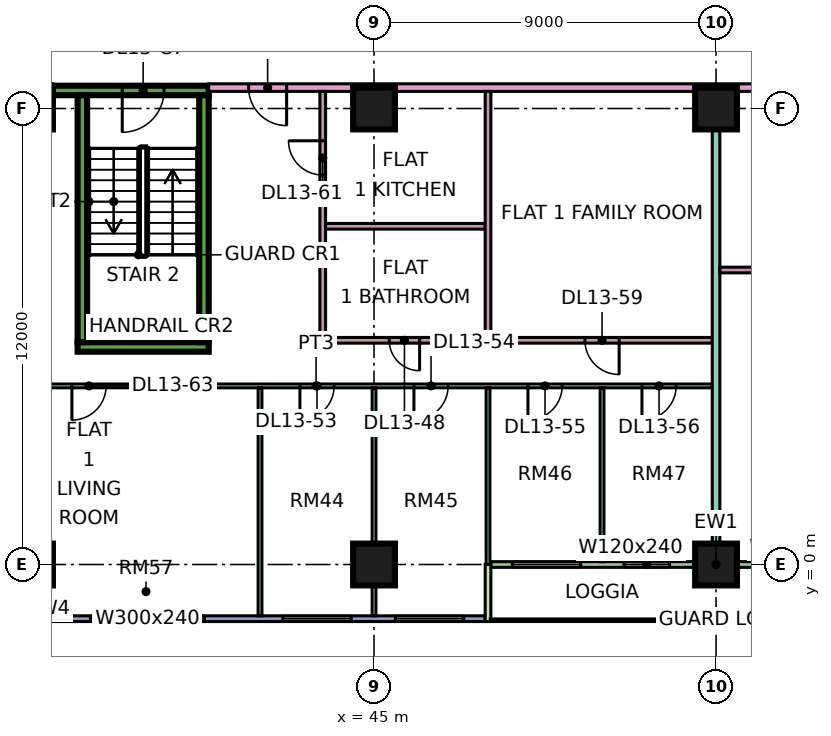
"""IFC4 building model, lengths in metres.
Left out: names, types, materials, properties, quantities, classifications, styles, units other than length and angle.
Written with IfcOpenShell. Run it as: python <this file> out.ifc"""

import sys

from ifc_helpers import new_model, si_unit, direction, frame, frame_2d, origin, origin_2d, place, context, subcontext, project, spatial, rectangle, extrude, element, fill, save


model = new_model("IFC4")
c1 = context("Model", 3, precision=1e-05, world=origin(), true_north=direction((0.0, 1.0)))
c2 = subcontext(c1, "Body", "Model", "MODEL_VIEW")
j1 = project(units=[si_unit("LENGTHUNIT", "METRE"), si_unit("PLANEANGLEUNIT", "RADIAN")], contexts=[c1])
p1 = place(None, origin())
s1 = spatial("IfcSite", under=j1, at=p1, CompositionType="ELEMENT")
p2 = place(p1, origin())
s2 = spatial("IfcBuilding", under=s1, at=p2, CompositionType="ELEMENT")
p3 = place(p2, frame((0.0, 0.0, 63.9)))
s3 = spatial("IfcBuildingStorey", under=s2, at=p3, CompositionType="ELEMENT", Elevation=63.9)
for number, where, z_axis, x_axis in (
    (1, (36.0, 0.0, 0.0), (0.0, 0.0, 1.0), (1.0, 0.0, 0.0)),
    (2, (36.0, 12.0, 0.0), (0.0, 0.0, 1.0), (1.0, 0.0, 0.0)),
    (3, (45.0, 0.0, 0.0), (0.0, 0.0, 1.0), (1.0, 0.0, 0.0)),
    (4, (45.0, 12.0, 0.0), (0.0, 0.0, 1.0), (1.0, 0.0, 0.0)),
    (5, (54.0, 0.0, 0.0), (0.0, 0.0, 1.0), (1.0, 0.0, 0.0)),
    (6, (54.0, 12.0, 0.0), (0.0, 0.0, 1.0), (1.0, 0.0, 0.0)),
):
    element("IfcColumn", number, at=place(p3, frame(where, z_axis=z_axis, x_axis=x_axis)), inside=s3, PredefinedType="COLUMN", context=c2, shape_type="SweptSolid", body=[
        extrude(rectangle(XDim=1.1, YDim=1.1, at=origin_2d()), origin(), (0.0, 0.0, 1.0), 3.75),
    ])
p4 = place(p3, frame((37.2, 5.725, 0.0), z_axis=(0.0, 0.0, 1.0), x_axis=(1.0, 0.0, 0.0)))
e7 = element("IfcWall", 7, at=p4, inside=s3, PredefinedType="SHEAR", context=c2, shape_type="SweptSolid", body=[
    extrude(rectangle(XDim=3.45, YDim=0.25, at=frame_2d((1.725, 0.0))), origin(), (0.0, 0.0, 1.0), 3.75),
])
p5 = place(p3, frame((36.55, 12.475, 0.0), z_axis=(0.0, 0.0, 1.0), x_axis=(1.0, 0.0, 0.0)))
e8 = element("IfcWall", 8, at=p5, inside=s3, PredefinedType="SHEAR", context=c2, shape_type="SweptSolid", body=[
    extrude(rectangle(XDim=4.1, YDim=0.25, at=frame_2d((2.05, 0.0))), origin(), (0.0, 0.0, 1.0), 3.75),
])
p6 = place(p5, frame((1.825, 0.0, 0.0)))
e9 = element("IfcOpeningElement", 9, at=p6, cuts=e8, PredefinedType="OPENING", context=c2, shape_type="SweptSolid", body=[
    extrude(rectangle(XDim=1.1, YDim=2.2, at=frame_2d((0.55, 1.1))), frame((0.0, 0.135, 0.0), z_axis=(0.0, -1.0, 0.0), x_axis=(1.0, 0.0, 0.0)), (0.0, 0.0, 1.0), 0.27),
])
for number, where, z_axis, x_axis in (
    (10, (37.325, 5.85, 0.0), (0.0, 0.0, 1.0), (0.0, 1.0, 0.0)),
    (11, (40.525, 5.85, 0.0), (0.0, 0.0, 1.0), (0.0, 1.0, 0.0)),
):
    element("IfcWall", number, at=place(p3, frame(where, z_axis=z_axis, x_axis=x_axis)), inside=s3, PredefinedType="SHEAR", context=c2, shape_type="SweptSolid", body=[
        extrude(rectangle(XDim=6.5, YDim=0.25, at=frame_2d((3.25, 0.0))), origin(), (0.0, 0.0, 1.0), 3.75),
    ])
p7 = place(p3, frame((36.075, -1.425, 0.0), z_axis=(0.0, 0.0, 1.0), x_axis=(1.0, 0.0, 0.0)))
e12 = element("IfcWall", 12, at=p7, inside=s3, PredefinedType="SOLIDWALL", context=c2, shape_type="SweptSolid", body=[
    extrude(rectangle(XDim=11.85, YDim=0.15, at=frame_2d((5.925, 0.0))), origin(), (0.0, 0.0, 1.0), 3.35),
])
p8 = place(p7, frame((1.462, 0.0, 0.45)))
e13 = element("IfcOpeningElement", 13, at=p8, cuts=e12, PredefinedType="OPENING", context=c2, shape_type="SweptSolid", body=[
    extrude(rectangle(XDim=3.0, YDim=2.4, at=frame_2d((1.5, 1.2))), frame((0.0, 0.085, 0.0), z_axis=(0.0, -1.0, 0.0), x_axis=(1.0, 0.0, 0.0)), (0.0, 0.0, 1.0), 0.17),
])
p9 = place(p7, frame((6.525, 0.0, 0.45)))
e14 = element("IfcOpeningElement", 14, at=p9, cuts=e12, PredefinedType="OPENING", context=c2, shape_type="SweptSolid", body=[
    extrude(rectangle(XDim=1.8, YDim=2.4, at=frame_2d((0.9, 1.2))), frame((0.0, 0.085, 0.0), z_axis=(0.0, -1.0, 0.0), x_axis=(1.0, 0.0, 0.0)), (0.0, 0.0, 1.0), 0.17),
])
p10 = place(p7, frame((9.488, 0.0, 0.45)))
e15 = element("IfcOpeningElement", 15, at=p10, cuts=e12, PredefinedType="OPENING", context=c2, shape_type="SweptSolid", body=[
    extrude(rectangle(XDim=1.8, YDim=2.4, at=frame_2d((0.9, 1.2))), frame((0.0, 0.085, 0.0), z_axis=(0.0, -1.0, 0.0), x_axis=(1.0, 0.0, 0.0)), (0.0, 0.0, 1.0), 0.17),
])
p11 = place(p3, frame((48.075, 0.0, 0.0), z_axis=(0.0, 0.0, 1.0), x_axis=(1.0, 0.0, 0.0)))
e16 = element("IfcWall", 16, at=p11, inside=s3, PredefinedType="SOLIDWALL", context=c2, shape_type="SweptSolid", body=[
    extrude(rectangle(XDim=11.85, YDim=0.15, at=frame_2d((5.925, 0.0))), origin(), (0.0, 0.0, 1.0), 3.35),
])
p12 = place(p11, frame((0.562, 0.0, 0.45)))
e17 = element("IfcOpeningElement", 17, at=p12, cuts=e16, PredefinedType="OPENING", context=c2, shape_type="SweptSolid", body=[
    extrude(rectangle(XDim=1.8, YDim=2.4, at=frame_2d((0.9, 1.2))), frame((0.0, 0.085, 0.0), z_axis=(0.0, -1.0, 0.0), x_axis=(1.0, 0.0, 0.0)), (0.0, 0.0, 1.0), 0.17),
])
p13 = place(p11, frame((3.5, 0.0, 0.45)))
e18 = element("IfcOpeningElement", 18, at=p13, cuts=e16, PredefinedType="OPENING", context=c2, shape_type="SweptSolid", body=[
    extrude(rectangle(XDim=1.2, YDim=2.4, at=frame_2d((0.6, 1.2))), frame((0.0, 0.085, 0.0), z_axis=(0.0, -1.0, 0.0), x_axis=(1.0, 0.0, 0.0)), (0.0, 0.0, 1.0), 0.17),
])
p14 = place(p11, frame((7.15, 0.0, 0.45)))
e19 = element("IfcOpeningElement", 19, at=p14, cuts=e16, PredefinedType="OPENING", context=c2, shape_type="SweptSolid", body=[
    extrude(rectangle(XDim=1.2, YDim=2.4, at=frame_2d((0.6, 1.2))), frame((0.0, 0.085, 0.0), z_axis=(0.0, -1.0, 0.0), x_axis=(1.0, 0.0, 0.0)), (0.0, 0.0, 1.0), 0.17),
])
p15 = place(p11, frame((9.488, 0.0, 0.45)))
e20 = element("IfcOpeningElement", 20, at=p15, cuts=e16, PredefinedType="OPENING", context=c2, shape_type="SweptSolid", body=[
    extrude(rectangle(XDim=1.8, YDim=2.4, at=frame_2d((0.9, 1.2))), frame((0.0, 0.085, 0.0), z_axis=(0.0, -1.0, 0.0), x_axis=(1.0, 0.0, 0.0)), (0.0, 0.0, 1.0), 0.17),
])
p16 = place(p3, frame((48.0, -1.5, 0.0), z_axis=(0.0, 0.0, 1.0), x_axis=(0.0, 1.0, 0.0)))
e21 = element("IfcWall", 21, at=p16, inside=s3, PredefinedType="SOLIDWALL", context=c2, shape_type="SweptSolid", body=[
    extrude(rectangle(XDim=1.5, YDim=0.15, at=frame_2d((0.75, 0.0))), origin(), (0.0, 0.0, 1.0), 3.35),
])
p17 = place(p3, frame((33.05, 4.7, 0.0), z_axis=(0.0, 0.0, 1.0), x_axis=(1.0, 0.0, 0.0)))
e22 = element("IfcWall", 22, at=p17, inside=s3, PredefinedType="PARTITIONING", context=c2, shape_type="SweptSolid", body=[
    extrude(rectangle(XDim=20.85, YDim=0.1, at=frame_2d((10.425, 0.0))), origin(), (0.0, 0.0, 1.0), 3.35),
])
p18 = place(p17, frame((10.0, 0.0, 0.0)))
e23 = element("IfcOpeningElement", 23, at=p18, cuts=e22, PredefinedType="OPENING", context=c2, shape_type="SweptSolid", body=[
    extrude(rectangle(XDim=0.9, YDim=2.1, at=frame_2d((0.45, 1.05))), frame((0.0, 0.06, 0.0), z_axis=(0.0, -1.0, 0.0), x_axis=(1.0, 0.0, 0.0)), (0.0, 0.0, 1.0), 0.12),
])
p19 = place(p17, frame((13.0, 0.0, 0.0)))
e24 = element("IfcOpeningElement", 24, at=p19, cuts=e22, PredefinedType="OPENING", context=c2, shape_type="SweptSolid", body=[
    extrude(rectangle(XDim=0.9, YDim=2.1, at=frame_2d((0.45, 1.05))), frame((0.0, 0.06, 0.0), z_axis=(0.0, -1.0, 0.0), x_axis=(1.0, 0.0, 0.0)), (0.0, 0.0, 1.0), 0.12),
])
p20 = place(p17, frame((16.0, 0.0, 0.0)))
e25 = element("IfcOpeningElement", 25, at=p20, cuts=e22, PredefinedType="OPENING", context=c2, shape_type="SweptSolid", body=[
    extrude(rectangle(XDim=0.9, YDim=2.1, at=frame_2d((0.45, 1.05))), frame((0.0, 0.06, 0.0), z_axis=(0.0, -1.0, 0.0), x_axis=(1.0, 0.0, 0.0)), (0.0, 0.0, 1.0), 0.12),
])
p21 = place(p17, frame((19.0, 0.0, 0.0)))
e26 = element("IfcOpeningElement", 26, at=p21, cuts=e22, PredefinedType="OPENING", context=c2, shape_type="SweptSolid", body=[
    extrude(rectangle(XDim=0.9, YDim=2.1, at=frame_2d((0.45, 1.05))), frame((0.0, 0.06, 0.0), z_axis=(0.0, -1.0, 0.0), x_axis=(1.0, 0.0, 0.0)), (0.0, 0.0, 1.0), 0.12),
])
p22 = place(p17, frame((4.0, 0.0, 0.0)))
e27 = element("IfcOpeningElement", 27, at=p22, cuts=e22, PredefinedType="OPENING", context=c2, shape_type="SweptSolid", body=[
    extrude(rectangle(XDim=0.9, YDim=2.1, at=frame_2d((0.45, 1.05))), frame((0.0, 0.06, 0.0), z_axis=(0.0, -1.0, 0.0), x_axis=(1.0, 0.0, 0.0)), (0.0, 0.0, 1.0), 0.12),
])
p23 = place(p3, frame((34.0, 12.55, 0.0), z_axis=(0.0, 0.0, 1.0), x_axis=(1.0, 0.0, 0.0)))
e28 = element("IfcWall", 28, at=p23, inside=s3, PredefinedType="PARTITIONING", context=c2, shape_type="SweptSolid", body=[
    extrude(rectangle(XDim=2.551, YDim=0.2, at=frame_2d((1.275, 0.0))), origin(), (0.0, 0.0, 1.0), 3.35),
])
p24 = place(p3, frame((40.65, 12.55, 0.0), z_axis=(0.0, 0.0, 1.0), x_axis=(1.0, 0.0, 0.0)))
e29 = element("IfcWall", 29, at=p24, inside=s3, PredefinedType="PARTITIONING", context=c2, shape_type="SweptSolid", body=[
    extrude(rectangle(XDim=31.35, YDim=0.2, at=frame_2d((15.675, 0.0))), origin(), (0.0, 0.0, 1.0), 3.35),
])
p25 = place(p24, frame((26.4, 0.0, 0.0)))
e30 = element("IfcOpeningElement", 30, at=p25, cuts=e29, PredefinedType="OPENING", context=c2, shape_type="SweptSolid", body=[
    extrude(rectangle(XDim=1.0, YDim=2.1, at=frame_2d((0.5, 1.05))), frame((0.0, 0.11, 0.0), z_axis=(0.0, -1.0, 0.0), x_axis=(1.0, 0.0, 0.0)), (0.0, 0.0, 1.0), 0.22),
])
p26 = place(p24, frame((1.05, 0.0, 0.0)))
e31 = element("IfcOpeningElement", 31, at=p26, cuts=e29, PredefinedType="OPENING", context=c2, shape_type="SweptSolid", body=[
    extrude(rectangle(XDim=1.0, YDim=2.1, at=frame_2d((0.5, 1.05))), frame((0.0, 0.11, 0.0), z_axis=(0.0, -1.0, 0.0), x_axis=(1.0, 0.0, 0.0)), (0.0, 0.0, 1.0), 0.22),
])
p27 = place(p3, frame((42.0, -1.35, 0.0), z_axis=(0.0, 0.0, 1.0), x_axis=(0.0, 1.0, 0.0)))
e32 = element("IfcWall", 32, at=p27, inside=s3, PredefinedType="PARTITIONING", context=c2, shape_type="SweptSolid", body=[
    extrude(rectangle(XDim=6.0, YDim=0.1, at=frame_2d((3.0, 0.0))), origin(), (0.0, 0.0, 1.0), 3.35),
])
p28 = place(p3, frame((43.575, 5.9, 0.0), z_axis=(0.0, 0.0, 1.0), x_axis=(1.0, 0.0, 0.0)))
e33 = element("IfcWall", 33, at=p28, inside=s3, PredefinedType="PARTITIONING", context=c2, shape_type="SweptSolid", body=[
    extrude(rectangle(XDim=10.325, YDim=0.15, at=frame_2d((5.163, 0.0))), origin(), (0.0, 0.0, 1.0), 3.35),
])
p29 = place(p28, frame((1.825, 0.0, 0.0)))
e34 = element("IfcOpeningElement", 34, at=p29, cuts=e33, PredefinedType="OPENING", context=c2, shape_type="SweptSolid", body=[
    extrude(rectangle(XDim=0.8, YDim=2.1, at=frame_2d((0.4, 1.05))), frame((0.0, 0.085, 0.0), z_axis=(0.0, -1.0, 0.0), x_axis=(1.0, 0.0, 0.0)), (0.0, 0.0, 1.0), 0.17),
])
p30 = place(p28, frame((6.975, 0.0, 0.0)))
e35 = element("IfcOpeningElement", 35, at=p30, cuts=e33, PredefinedType="OPENING", context=c2, shape_type="SweptSolid", body=[
    extrude(rectangle(XDim=0.9, YDim=2.1, at=frame_2d((0.45, 1.05))), frame((0.0, 0.085, 0.0), z_axis=(0.0, -1.0, 0.0), x_axis=(1.0, 0.0, 0.0)), (0.0, 0.0, 1.0), 0.17),
])
p31 = place(p3, frame((43.65, 5.975, 0.0), z_axis=(0.0, 0.0, 1.0), x_axis=(0.0, 1.0, 0.0)))
e36 = element("IfcWall", 36, at=p31, inside=s3, PredefinedType="PARTITIONING", context=c2, shape_type="SweptSolid", body=[
    extrude(rectangle(XDim=6.475, YDim=0.15, at=frame_2d((3.237, 0.0))), origin(), (0.0, 0.0, 1.0), 3.35),
])
p32 = place(p31, frame((4.275, 0.0, 0.0)))
e37 = element("IfcOpeningElement", 37, at=p32, cuts=e36, PredefinedType="OPENING", context=c2, shape_type="SweptSolid", body=[
    extrude(rectangle(XDim=0.9, YDim=2.1, at=frame_2d((0.45, 1.05))), frame((0.0, 0.085, 0.0), z_axis=(0.0, -1.0, 0.0), x_axis=(1.0, 0.0, 0.0)), (0.0, 0.0, 1.0), 0.17),
])
p33 = place(p3, frame((43.725, 8.9, 0.0), z_axis=(0.0, 0.0, 1.0), x_axis=(1.0, 0.0, 0.0)))
e38 = element("IfcWall", 38, at=p33, inside=s3, PredefinedType="PARTITIONING", context=c2, shape_type="SweptSolid", body=[
    extrude(rectangle(XDim=4.2, YDim=0.15, at=frame_2d((2.1, 0.0))), origin(), (0.0, 0.0, 1.0), 3.35),
])
p34 = place(p3, frame((45.0, -1.351, 0.0), z_axis=(0.0, 0.0, 1.0), x_axis=(0.0, 1.0, 0.0)))
e39 = element("IfcWall", 39, at=p34, inside=s3, PredefinedType="PARTITIONING", context=c2, shape_type="SweptSolid", body=[
    extrude(rectangle(XDim=6.001, YDim=0.1, at=frame_2d((3.0, 0.0))), origin(), (0.0, 0.0, 1.0), 3.35),
])
p35 = place(p3, frame((48.0, 0.0, 0.0), z_axis=(0.0, 0.0, 1.0), x_axis=(0.0, 1.0, 0.0)))
e40 = element("IfcWall", 40, at=p35, inside=s3, PredefinedType="PARTITIONING", context=c2, shape_type="SweptSolid", body=[
    extrude(rectangle(XDim=4.65, YDim=0.1, at=frame_2d((2.325, 0.0))), origin(), (0.0, 0.0, 1.0), 3.35),
])
p36 = place(p3, frame((48.0, 5.975, 0.0), z_axis=(0.0, 0.0, 1.0), x_axis=(0.0, 1.0, 0.0)))
e41 = element("IfcWall", 41, at=p36, inside=s3, PredefinedType="PARTITIONING", context=c2, shape_type="SweptSolid", body=[
    extrude(rectangle(XDim=6.475, YDim=0.15, at=frame_2d((3.237, 0.0))), origin(), (0.0, 0.0, 1.0), 3.35),
])
p37 = place(p3, frame((51.0, 0.074, 0.0), z_axis=(0.0, 0.0, 1.0), x_axis=(0.0, 1.0, 0.0)))
e42 = element("IfcWall", 42, at=p37, inside=s3, PredefinedType="PARTITIONING", context=c2, shape_type="SweptSolid", body=[
    extrude(rectangle(XDim=4.576, YDim=0.1, at=frame_2d((2.288, 0.0))), origin(), (0.0, 0.0, 1.0), 3.35),
])
p38 = place(p3, frame((54.0, 0.074, 0.0), z_axis=(0.0, 0.0, 1.0), x_axis=(0.0, 1.0, 0.0)))
e43 = element("IfcWall", 43, at=p38, inside=s3, PredefinedType="PARTITIONING", context=c2, shape_type="SweptSolid", body=[
    extrude(rectangle(XDim=12.376, YDim=0.2, at=frame_2d((6.188, 0.0))), origin(), (0.0, 0.0, 1.0), 3.35),
])
p39 = place(p3, frame((54.1, 7.75, 0.0), z_axis=(0.0, 0.0, 1.0), x_axis=(1.0, 0.0, 0.0)))
e44 = element("IfcWall", 44, at=p39, inside=s3, PredefinedType="PARTITIONING", context=c2, shape_type="SweptSolid", body=[
    extrude(rectangle(XDim=12.575, YDim=0.15, at=frame_2d((6.288, 0.0))), origin(), (0.0, 0.0, 1.0), 3.35),
])
p40 = place(p39, frame((10.2, 0.0, 0.0)))
e45 = element("IfcOpeningElement", 45, at=p40, cuts=e44, PredefinedType="OPENING", context=c2, shape_type="SweptSolid", body=[
    extrude(rectangle(XDim=0.8, YDim=2.1, at=frame_2d((0.4, 1.05))), frame((0.0, 0.085, 0.0), z_axis=(0.0, -1.0, 0.0), x_axis=(1.0, 0.0, 0.0)), (0.0, 0.0, 1.0), 0.17),
])
p41 = place(p39, frame((2.6, 0.0, 0.0)))
e46 = element("IfcOpeningElement", 46, at=p41, cuts=e44, PredefinedType="OPENING", context=c2, shape_type="SweptSolid", body=[
    extrude(rectangle(XDim=0.9, YDim=2.1, at=frame_2d((0.45, 1.05))), frame((0.0, 0.085, 0.0), z_axis=(0.0, -1.0, 0.0), x_axis=(1.0, 0.0, 0.0)), (0.0, 0.0, 1.0), 0.17),
])
p42 = place(p39, frame((7.05, 0.0, 0.0)))
e47 = element("IfcOpeningElement", 47, at=p42, cuts=e44, PredefinedType="OPENING", context=c2, shape_type="SweptSolid", body=[
    extrude(rectangle(XDim=0.8, YDim=2.1, at=frame_2d((0.4, 1.05))), frame((0.0, 0.085, 0.0), z_axis=(0.0, -1.0, 0.0), x_axis=(1.0, 0.0, 0.0)), (0.0, 0.0, 1.0), 0.17),
])
p43 = place(p8, origin())
e48 = element("IfcWindow", 48, at=p43, inside=s3, PartitioningType="SINGLE_PANEL", PredefinedType="WINDOW", context=c2, shape_type="SweptSolid", body=[
    extrude(rectangle(XDim=3.0, YDim=2.4, at=frame_2d((1.5, 1.2))), frame((0.0, 0.03, 0.0), z_axis=(0.0, -1.0, 0.0), x_axis=(1.0, 0.0, 0.0)), (0.0, 0.0, 1.0), 0.06),
])
fill(e13, e48)
p44 = place(p9, origin())
e49 = element("IfcWindow", 49, at=p44, inside=s3, PartitioningType="SINGLE_PANEL", PredefinedType="WINDOW", context=c2, shape_type="SweptSolid", body=[
    extrude(rectangle(XDim=1.8, YDim=2.4, at=frame_2d((0.9, 1.2))), frame((0.0, 0.03, 0.0), z_axis=(0.0, -1.0, 0.0), x_axis=(1.0, 0.0, 0.0)), (0.0, 0.0, 1.0), 0.06),
])
fill(e14, e49)
p45 = place(p10, origin())
e50 = element("IfcWindow", 50, at=p45, inside=s3, PartitioningType="SINGLE_PANEL", PredefinedType="WINDOW", context=c2, shape_type="SweptSolid", body=[
    extrude(rectangle(XDim=1.8, YDim=2.4, at=frame_2d((0.9, 1.2))), frame((0.0, 0.03, 0.0), z_axis=(0.0, -1.0, 0.0), x_axis=(1.0, 0.0, 0.0)), (0.0, 0.0, 1.0), 0.06),
])
fill(e15, e50)
p46 = place(p12, origin())
e51 = element("IfcWindow", 51, at=p46, inside=s3, PartitioningType="SINGLE_PANEL", PredefinedType="WINDOW", context=c2, shape_type="SweptSolid", body=[
    extrude(rectangle(XDim=1.8, YDim=2.4, at=frame_2d((0.9, 1.2))), frame((0.0, 0.03, 0.0), z_axis=(0.0, -1.0, 0.0), x_axis=(1.0, 0.0, 0.0)), (0.0, 0.0, 1.0), 0.06),
])
fill(e17, e51)
p47 = place(p13, origin())
e52 = element("IfcWindow", 52, at=p47, inside=s3, PartitioningType="SINGLE_PANEL", PredefinedType="WINDOW", context=c2, shape_type="SweptSolid", body=[
    extrude(rectangle(XDim=1.2, YDim=2.4, at=frame_2d((0.6, 1.2))), frame((0.0, 0.03, 0.0), z_axis=(0.0, -1.0, 0.0), x_axis=(1.0, 0.0, 0.0)), (0.0, 0.0, 1.0), 0.06),
])
fill(e18, e52)
p48 = place(p6, frame((1.1, 0.0, 0.0), z_axis=(0.0, 0.0, 1.0), x_axis=(-1.0, 0.0, 0.0)))
e53 = element("IfcDoor", 53, at=p48, inside=s3, OperationType="SINGLE_SWING_LEFT", PredefinedType="DOOR", context=c2, shape_type="SweptSolid", body=[
    extrude(rectangle(XDim=1.1, YDim=2.2, at=frame_2d((0.55, 1.1))), frame((0.0, 0.025, 0.0), z_axis=(0.0, -1.0, 0.0), x_axis=(1.0, 0.0, 0.0)), (0.0, 0.0, 1.0), 0.05),
])
fill(e9, e53)
p49 = place(p29, origin())
e54 = element("IfcDoor", 54, at=p49, inside=s3, OperationType="SINGLE_SWING_RIGHT", PredefinedType="DOOR", context=c2, shape_type="SweptSolid", body=[
    extrude(rectangle(XDim=0.8, YDim=2.1, at=frame_2d((0.4, 1.05))), frame((0.0, 0.025, 0.0), z_axis=(0.0, -1.0, 0.0), x_axis=(1.0, 0.0, 0.0)), (0.0, 0.0, 1.0), 0.05),
])
fill(e34, e54)
p50 = place(p18, frame((0.9, 0.0, 0.0), z_axis=(0.0, 0.0, 1.0), x_axis=(-1.0, 0.0, 0.0)))
e55 = element("IfcDoor", 55, at=p50, inside=s3, OperationType="SINGLE_SWING_LEFT", PredefinedType="DOOR", context=c2, shape_type="SweptSolid", body=[
    extrude(rectangle(XDim=0.9, YDim=2.1, at=frame_2d((0.45, 1.05))), frame((0.0, 0.025, 0.0), z_axis=(0.0, -1.0, 0.0), x_axis=(1.0, 0.0, 0.0)), (0.0, 0.0, 1.0), 0.05),
])
fill(e23, e55)
p51 = place(p19, frame((0.9, 0.0, 0.0), z_axis=(0.0, 0.0, 1.0), x_axis=(-1.0, 0.0, 0.0)))
e56 = element("IfcDoor", 56, at=p51, inside=s3, OperationType="SINGLE_SWING_LEFT", PredefinedType="DOOR", context=c2, shape_type="SweptSolid", body=[
    extrude(rectangle(XDim=0.9, YDim=2.1, at=frame_2d((0.45, 1.05))), frame((0.0, 0.025, 0.0), z_axis=(0.0, -1.0, 0.0), x_axis=(1.0, 0.0, 0.0)), (0.0, 0.0, 1.0), 0.05),
])
fill(e24, e56)
p52 = place(p20, frame((0.9, 0.0, 0.0), z_axis=(0.0, 0.0, 1.0), x_axis=(-1.0, 0.0, 0.0)))
e57 = element("IfcDoor", 57, at=p52, inside=s3, OperationType="SINGLE_SWING_LEFT", PredefinedType="DOOR", context=c2, shape_type="SweptSolid", body=[
    extrude(rectangle(XDim=0.9, YDim=2.1, at=frame_2d((0.45, 1.05))), frame((0.0, 0.025, 0.0), z_axis=(0.0, -1.0, 0.0), x_axis=(1.0, 0.0, 0.0)), (0.0, 0.0, 1.0), 0.05),
])
fill(e25, e57)
p53 = place(p21, frame((0.9, 0.0, 0.0), z_axis=(0.0, 0.0, 1.0), x_axis=(-1.0, 0.0, 0.0)))
e58 = element("IfcDoor", 58, at=p53, inside=s3, OperationType="SINGLE_SWING_LEFT", PredefinedType="DOOR", context=c2, shape_type="SweptSolid", body=[
    extrude(rectangle(XDim=0.9, YDim=2.1, at=frame_2d((0.45, 1.05))), frame((0.0, 0.025, 0.0), z_axis=(0.0, -1.0, 0.0), x_axis=(1.0, 0.0, 0.0)), (0.0, 0.0, 1.0), 0.05),
])
fill(e26, e58)
p54 = place(p30, origin())
e59 = element("IfcDoor", 59, at=p54, inside=s3, OperationType="SINGLE_SWING_RIGHT", PredefinedType="DOOR", context=c2, shape_type="SweptSolid", body=[
    extrude(rectangle(XDim=0.9, YDim=2.1, at=frame_2d((0.45, 1.05))), frame((0.0, 0.025, 0.0), z_axis=(0.0, -1.0, 0.0), x_axis=(1.0, 0.0, 0.0)), (0.0, 0.0, 1.0), 0.05),
])
fill(e35, e59)
p55 = place(p26, origin())
e60 = element("IfcDoor", 60, at=p55, inside=s3, OperationType="SINGLE_SWING_RIGHT", PredefinedType="DOOR", context=c2, shape_type="SweptSolid", body=[
    extrude(rectangle(XDim=1.0, YDim=2.1, at=frame_2d((0.5, 1.05))), frame((0.0, 0.025, 0.0), z_axis=(0.0, -1.0, 0.0), x_axis=(1.0, 0.0, 0.0)), (0.0, 0.0, 1.0), 0.05),
])
fill(e31, e60)
p56 = place(p32, frame((0.9, 0.0, 0.0), z_axis=(0.0, 0.0, 1.0), x_axis=(-1.0, 0.0, 0.0)))
e61 = element("IfcDoor", 61, at=p56, inside=s3, OperationType="SINGLE_SWING_RIGHT", PredefinedType="DOOR", context=c2, shape_type="SweptSolid", body=[
    extrude(rectangle(XDim=0.9, YDim=2.1, at=frame_2d((0.45, 1.05))), frame((0.0, 0.025, 0.0), z_axis=(0.0, -1.0, 0.0), x_axis=(1.0, 0.0, 0.0)), (0.0, 0.0, 1.0), 0.05),
])
fill(e37, e61)
p57 = place(p22, frame((0.9, 0.0, 0.0), z_axis=(0.0, 0.0, 1.0), x_axis=(-1.0, 0.0, 0.0)))
e62 = element("IfcDoor", 62, at=p57, inside=s3, OperationType="SINGLE_SWING_LEFT", PredefinedType="DOOR", context=c2, shape_type="SweptSolid", body=[
    extrude(rectangle(XDim=0.9, YDim=2.1, at=frame_2d((0.45, 1.05))), frame((0.0, 0.025, 0.0), z_axis=(0.0, -1.0, 0.0), x_axis=(1.0, 0.0, 0.0)), (0.0, 0.0, 1.0), 0.05),
])
fill(e27, e62)
save(model, sys.argv[1])
